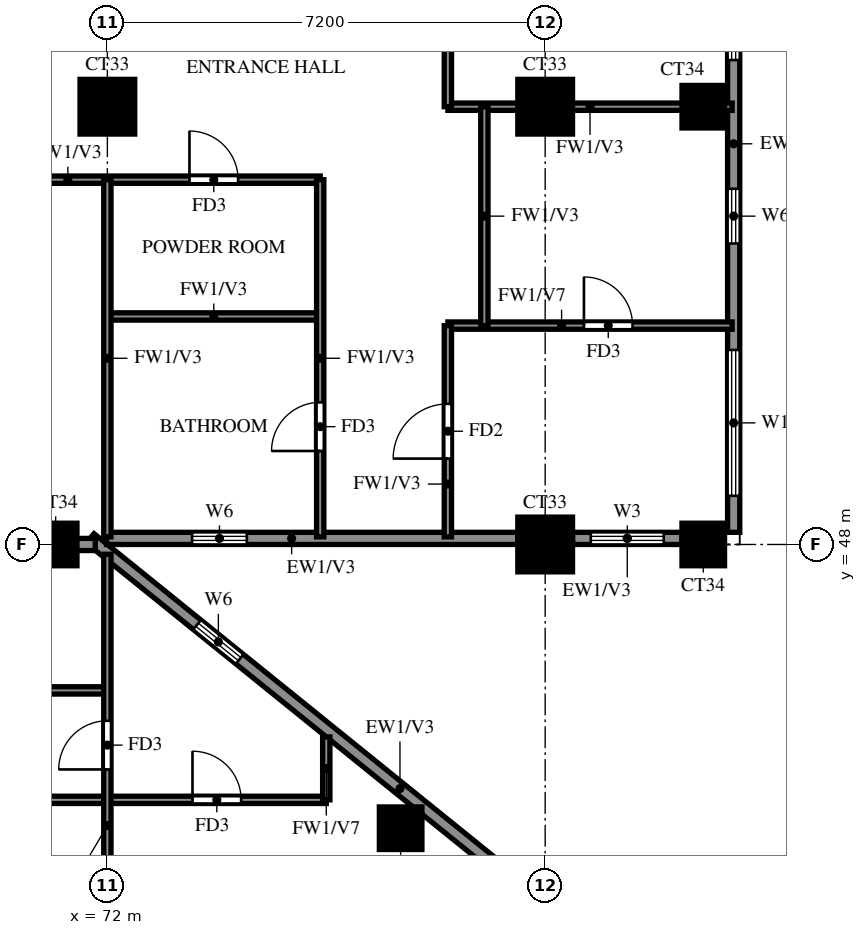
"""IFC4 building model, lengths in metres.
Left out: names, types, materials, properties, quantities, classifications, styles, units other than length and angle.
Written with IfcOpenShell. Run it as: python <this file> out.ifc"""

import sys

from ifc_helpers import new_model, si_unit, direction, frame, frame_2d, origin, origin_2d, place, context, subcontext, project, spatial, rectangle, extrude, source, transform, mapped, element, fill, save


model = new_model("IFC4")
c1 = context("Model", 3, precision=1e-05, world=origin(), true_north=direction((0.0, 1.0)))
c2 = subcontext(c1, "Body", "Model", "MODEL_VIEW")
j1 = project(units=[si_unit("LENGTHUNIT", "METRE"), si_unit("PLANEANGLEUNIT", "RADIAN")], contexts=[c1])
p1 = place(None, origin())
s1 = spatial("IfcSite", under=j1, at=p1, CompositionType="ELEMENT")
p2 = place(p1, origin())
s2 = spatial("IfcBuilding", under=s1, at=p2, CompositionType="ELEMENT")
p3 = place(p2, frame((0.0, 0.0, 229.0)))
s3 = spatial("IfcBuildingStorey", under=s2, at=p3, CompositionType="ELEMENT", Elevation=229.0)
m1 = source(origin(), c2, "Body", "SweptSolid", [
    extrude(rectangle(XDim=0.7, YDim=0.7, at=origin_2d()), origin(), (0.0, 0.0, 1.0), 3.22),
])
for number, where, z_axis, x_axis in (
    (1, (76.823, 43.333, 0.0), (0.0, 0.0, 1.0), (1.0, 0.0, 0.0)),
    (2, (71.15, 48.0, 0.0), (0.0, 0.0, 1.0), (1.0, 0.0, 0.0)),
):
    element("IfcColumn", number, at=place(p3, frame(where, z_axis=z_axis, x_axis=x_axis)), inside=s3, PredefinedType="COLUMN", context=c2, shape_type="MappedRepresentation", body=[
        mapped(m1, transform((0.0, 0.0, 0.0))),
    ])
m2 = source(origin(), c2, "Body", "SweptSolid", [
    extrude(rectangle(XDim=0.9, YDim=0.9, at=origin_2d()), origin(), (0.0, 0.0, 1.0), 3.22),
])
p4 = place(p3, frame((79.2, 48.0, 0.0), z_axis=(0.0, 0.0, 1.0), x_axis=(1.0, 0.0, 0.0)))
e3 = element("IfcColumn", 3, at=p4, inside=s3, PredefinedType="COLUMN", context=c2, shape_type="MappedRepresentation", body=[
    mapped(m2, transform((0.0, 0.0, 0.0))),
])
p5 = place(p3, frame((81.8, 48.0, 0.0), z_axis=(0.0, 0.0, 1.0), x_axis=(1.0, 0.0, 0.0)))
e4 = element("IfcColumn", 4, at=p5, inside=s3, PredefinedType="COLUMN", context=c2, shape_type="MappedRepresentation", body=[
    mapped(m1, transform((0.0, 0.0, 0.0))),
])
for number, where, z_axis, x_axis in (
    (5, (72.0, 55.2, 0.0), (0.0, 0.0, 1.0), (1.0, 0.0, 0.0)),
    (6, (79.2, 55.2, 0.0), (0.0, 0.0, 1.0), (1.0, 0.0, 0.0)),
):
    element("IfcColumn", number, at=place(p3, frame(where, z_axis=z_axis, x_axis=x_axis)), inside=s3, PredefinedType="COLUMN", context=c2, shape_type="MappedRepresentation", body=[
        mapped(m2, transform((0.0, 0.0, 0.0))),
    ])
p6 = place(p3, frame((81.8, 55.2, 0.0), z_axis=(0.0, 0.0, 1.0), x_axis=(1.0, 0.0, 0.0)))
e7 = element("IfcColumn", 7, at=p6, inside=s3, PredefinedType="COLUMN", context=c2, shape_type="MappedRepresentation", body=[
    mapped(m1, transform((0.0, 0.0, 0.0))),
])
p7 = place(p3, frame((81.907, 39.87, 0.0), z_axis=(0.0, 0.0, 1.0), x_axis=(-0.777936274417, 0.62834318087, 0.0)))
e8 = element("IfcWall", 8, at=p7, inside=s3, PredefinedType="SOLIDWALL", context=c2, shape_type="SweptSolid", body=[
    extrude(rectangle(XDim=13.099, YDim=0.2, at=frame_2d((6.549, 0.0))), origin(), (0.0, 0.0, 1.0), 3.22),
])
p8 = place(p7, frame((9.938, 0.0, 1.5)))
e9 = element("IfcOpeningElement", 9, at=p8, cuts=e8, PredefinedType="OPENING", context=c2, shape_type="SweptSolid", body=[
    extrude(rectangle(XDim=0.9, YDim=0.9, at=frame_2d((0.45, 0.45))), frame((0.0, 0.11, 0.0), z_axis=(0.0, -1.0, 0.0), x_axis=(1.0, 0.0, 0.0)), (0.0, 0.0, 1.0), 0.22),
])
p9 = place(p3, frame((71.987, 48.1, 0.0), z_axis=(0.0, 0.0, 1.0), x_axis=(1.0, 0.0, 0.0)))
e10 = element("IfcWall", 10, at=p9, inside=s3, PredefinedType="SOLIDWALL", context=c2, shape_type="SweptSolid", body=[
    extrude(rectangle(XDim=6.763, YDim=0.2, at=frame_2d((3.381, 0.0))), origin(), (0.0, 0.0, 1.0), 3.22),
])
p10 = place(p9, frame((1.406, 0.0, 1.5)))
e11 = element("IfcOpeningElement", 11, at=p10, cuts=e10, PredefinedType="OPENING", context=c2, shape_type="SweptSolid", body=[
    extrude(rectangle(XDim=0.9, YDim=0.9, at=frame_2d((0.45, 0.45))), frame((0.0, 0.11, 0.0), z_axis=(0.0, -1.0, 0.0), x_axis=(1.0, 0.0, 0.0)), (0.0, 0.0, 1.0), 0.22),
])
p11 = place(p3, frame((79.65, 48.1, 0.0), z_axis=(0.0, 0.0, 1.0), x_axis=(1.0, 0.0, 0.0)))
e12 = element("IfcWall", 12, at=p11, inside=s3, PredefinedType="SOLIDWALL", context=c2, shape_type="SweptSolid", body=[
    extrude(rectangle(XDim=1.8, YDim=0.2, at=frame_2d((0.9, 0.0))), origin(), (0.0, 0.0, 1.0), 3.22),
])
p12 = place(p11, frame((0.3, 0.0, 0.6)))
e13 = element("IfcOpeningElement", 13, at=p12, cuts=e12, PredefinedType="OPENING", context=c2, shape_type="SweptSolid", body=[
    extrude(rectangle(XDim=1.2, YDim=2.4, at=frame_2d((0.6, 1.2))), frame((0.0, 0.11, 0.0), z_axis=(0.0, -1.0, 0.0), x_axis=(1.0, 0.0, 0.0)), (0.0, 0.0, 1.0), 0.22),
])
p13 = place(p3, frame((82.3, 48.2, 0.0), z_axis=(0.0, 0.0, 1.0), x_axis=(0.0, 1.0, 0.0)))
e14 = element("IfcWall", 14, at=p13, inside=s3, PredefinedType="SOLIDWALL", context=c2, shape_type="SweptSolid", body=[
    extrude(rectangle(XDim=14.2, YDim=0.2, at=frame_2d((7.1, 0.0))), origin(), (0.0, 0.0, 1.0), 3.22),
])
p14 = place(p13, frame((0.6, 0.0, 0.6)))
e15 = element("IfcOpeningElement", 15, at=p14, cuts=e14, PredefinedType="OPENING", context=c2, shape_type="SweptSolid", body=[
    extrude(rectangle(XDim=2.4, YDim=2.4, at=frame_2d((1.2, 1.2))), frame((0.0, 0.11, 0.0), z_axis=(0.0, -1.0, 0.0), x_axis=(1.0, 0.0, 0.0)), (0.0, 0.0, 1.0), 0.22),
])
p15 = place(p13, frame((4.75, 0.0, 1.5)))
e16 = element("IfcOpeningElement", 16, at=p15, cuts=e14, PredefinedType="OPENING", context=c2, shape_type="SweptSolid", body=[
    extrude(rectangle(XDim=0.9, YDim=0.9, at=frame_2d((0.45, 0.45))), frame((0.0, 0.11, 0.0), z_axis=(0.0, -1.0, 0.0), x_axis=(1.0, 0.0, 0.0)), (0.0, 0.0, 1.0), 0.22),
])
p16 = place(p13, frame((7.767, 0.0, 0.6)))
e17 = element("IfcOpeningElement", 17, at=p16, cuts=e14, PredefinedType="OPENING", context=c2, shape_type="SweptSolid", body=[
    extrude(rectangle(XDim=2.4, YDim=2.4, at=frame_2d((1.2, 1.2))), frame((0.0, 0.11, 0.0), z_axis=(0.0, -1.0, 0.0), x_axis=(1.0, 0.0, 0.0)), (0.0, 0.0, 1.0), 0.22),
])
p17 = place(p13, frame((10.833, 0.0, 0.6)))
e18 = element("IfcOpeningElement", 18, at=p17, cuts=e14, PredefinedType="OPENING", context=c2, shape_type="SweptSolid", body=[
    extrude(rectangle(XDim=2.4, YDim=2.4, at=frame_2d((1.2, 1.2))), frame((0.0, 0.11, 0.0), z_axis=(0.0, -1.0, 0.0), x_axis=(1.0, 0.0, 0.0)), (0.0, 0.0, 1.0), 0.22),
])
p18 = place(p3, frame((67.2, 48.0, 0.0), z_axis=(0.0, 0.0, 1.0), x_axis=(1.0, 0.0, 0.0)))
e19 = element("IfcWall", 19, at=p18, inside=s3, PredefinedType="SOLIDWALL", context=c2, shape_type="SweptSolid", body=[
    extrude(rectangle(XDim=4.601, YDim=0.2, at=frame_2d((2.301, 0.0))), origin(), (0.0, 0.0, 1.0), 3.22),
])
p19 = place(p3, frame((60.0, 43.8, 0.0), z_axis=(0.0, 0.0, 1.0), x_axis=(1.0, 0.0, 0.0)))
e20 = element("IfcWall", 20, at=p19, inside=s3, PredefinedType="PARTITIONING", context=c2, shape_type="SweptSolid", body=[
    extrude(rectangle(XDim=15.6, YDim=0.12, at=frame_2d((7.8, 0.0))), origin(), (0.0, 0.0, 1.0), 3.22),
])
p20 = place(p19, frame((9.75, 0.0, 0.0)))
e21 = element("IfcOpeningElement", 21, at=p20, cuts=e20, PredefinedType="OPENING", context=c2, shape_type="SweptSolid", body=[
    extrude(rectangle(XDim=0.9, YDim=2.1, at=frame_2d((0.45, 1.05))), frame((0.0, 0.07, 0.0), z_axis=(0.0, -1.0, 0.0), x_axis=(1.0, 0.0, 0.0)), (0.0, 0.0, 1.0), 0.14),
])
p21 = place(p19, frame((3.45, 0.0, 0.0)))
e22 = element("IfcOpeningElement", 22, at=p21, cuts=e20, PredefinedType="OPENING", context=c2, shape_type="SweptSolid", body=[
    extrude(rectangle(XDim=1.5, YDim=2.1, at=frame_2d((0.75, 1.05))), frame((0.0, 0.07, 0.0), z_axis=(0.0, -1.0, 0.0), x_axis=(1.0, 0.0, 0.0)), (0.0, 0.0, 1.0), 0.14),
])
p22 = place(p19, frame((13.4, 0.0, 0.0)))
e23 = element("IfcOpeningElement", 23, at=p22, cuts=e20, PredefinedType="OPENING", context=c2, shape_type="SweptSolid", body=[
    extrude(rectangle(XDim=0.8, YDim=2.1, at=frame_2d((0.4, 1.05))), frame((0.0, 0.07, 0.0), z_axis=(0.0, -1.0, 0.0), x_axis=(1.0, 0.0, 0.0)), (0.0, 0.0, 1.0), 0.14),
])
p23 = place(p3, frame((67.2, 45.6, 0.0), z_axis=(0.0, 0.0, 1.0), x_axis=(1.0, 0.0, 0.0)))
e24 = element("IfcWall", 24, at=p23, inside=s3, PredefinedType="PARTITIONING", context=c2, shape_type="SweptSolid", body=[
    extrude(rectangle(XDim=4.8, YDim=0.12, at=frame_2d((2.4, 0.0))), origin(), (0.0, 0.0, 1.0), 3.22),
])
p24 = place(p23, frame((1.95, 0.0, 0.0)))
e25 = element("IfcOpeningElement", 25, at=p24, cuts=e24, PredefinedType="OPENING", context=c2, shape_type="SweptSolid", body=[
    extrude(rectangle(XDim=0.9, YDim=2.1, at=frame_2d((0.45, 1.05))), frame((0.0, 0.07, 0.0), z_axis=(0.0, -1.0, 0.0), x_axis=(1.0, 0.0, 0.0)), (0.0, 0.0, 1.0), 0.14),
])
p25 = place(p3, frame((77.6, 51.6, 0.0), z_axis=(0.0, 0.0, 1.0), x_axis=(1.0, 0.0, 0.0)))
e26 = element("IfcWall", 26, at=p25, inside=s3, PredefinedType="PARTITIONING", context=c2, shape_type="SweptSolid", body=[
    extrude(rectangle(XDim=4.675, YDim=0.12, at=frame_2d((2.337, 0.0))), origin(), (0.0, 0.0, 1.0), 2.32),
])
p26 = place(p25, frame((2.238, 0.0, 0.0)))
e27 = element("IfcOpeningElement", 27, at=p26, cuts=e26, PredefinedType="OPENING", context=c2, shape_type="SweptSolid", body=[
    extrude(rectangle(XDim=0.8, YDim=2.1, at=frame_2d((0.4, 1.05))), frame((0.0, 0.07, 0.0), z_axis=(0.0, -1.0, 0.0), x_axis=(1.0, 0.0, 0.0)), (0.0, 0.0, 1.0), 0.14),
])
p27 = place(p3, frame((72.0, 51.75, 0.0), z_axis=(0.0, 0.0, 1.0), x_axis=(1.0, 0.0, 0.0)))
e28 = element("IfcWall", 28, at=p27, inside=s3, PredefinedType="PARTITIONING", context=c2, shape_type="SweptSolid", body=[
    extrude(rectangle(XDim=3.5, YDim=0.12, at=frame_2d((1.75, 0.0))), origin(), (0.0, 0.0, 1.0), 3.22),
])
p28 = place(p3, frame((67.2, 54.0, 0.0), z_axis=(0.0, 0.0, 1.0), x_axis=(1.0, 0.0, 0.0)))
e29 = element("IfcWall", 29, at=p28, inside=s3, PredefinedType="PARTITIONING", context=c2, shape_type="SweptSolid", body=[
    extrude(rectangle(XDim=8.3, YDim=0.12, at=frame_2d((4.15, 0.0))), origin(), (0.0, 0.0, 1.0), 3.22),
])
p29 = place(p28, frame((6.15, 0.0, 0.0)))
e30 = element("IfcOpeningElement", 30, at=p29, cuts=e29, PredefinedType="OPENING", context=c2, shape_type="SweptSolid", body=[
    extrude(rectangle(XDim=0.8, YDim=2.1, at=frame_2d((0.4, 1.05))), frame((0.0, 0.07, 0.0), z_axis=(0.0, -1.0, 0.0), x_axis=(1.0, 0.0, 0.0)), (0.0, 0.0, 1.0), 0.14),
])
p30 = place(p28, frame((1.95, 0.0, 0.0)))
e31 = element("IfcOpeningElement", 31, at=p30, cuts=e29, PredefinedType="OPENING", context=c2, shape_type="SweptSolid", body=[
    extrude(rectangle(XDim=0.9, YDim=2.1, at=frame_2d((0.45, 1.05))), frame((0.0, 0.07, 0.0), z_axis=(0.0, -1.0, 0.0), x_axis=(1.0, 0.0, 0.0)), (0.0, 0.0, 1.0), 0.14),
])
p31 = place(p3, frame((77.6, 55.2, 0.0), z_axis=(0.0, 0.0, 1.0), x_axis=(1.0, 0.0, 0.0)))
e32 = element("IfcWall", 32, at=p31, inside=s3, PredefinedType="PARTITIONING", context=c2, shape_type="SweptSolid", body=[
    extrude(rectangle(XDim=4.675, YDim=0.12, at=frame_2d((2.337, 0.0))), origin(), (0.0, 0.0, 1.0), 3.22),
])
p32 = place(p3, frame((72.0, 39.725, 0.0), z_axis=(0.0, 0.0, 1.0), x_axis=(0.0, 1.0, 0.0)))
e33 = element("IfcWall", 33, at=p32, inside=s3, PredefinedType="PARTITIONING", context=c2, shape_type="SweptSolid", body=[
    extrude(rectangle(XDim=8.114, YDim=0.12, at=frame_2d((4.057, 0.0))), origin(), (0.0, 0.0, 1.0), 2.32),
])
p33 = place(p32, frame((1.788, 0.0, 0.0)))
e34 = element("IfcOpeningElement", 34, at=p33, cuts=e33, PredefinedType="OPENING", context=c2, shape_type="SweptSolid", body=[
    extrude(rectangle(XDim=0.9, YDim=2.1, at=frame_2d((0.45, 1.05))), frame((0.0, 0.07, 0.0), z_axis=(0.0, -1.0, 0.0), x_axis=(1.0, 0.0, 0.0)), (0.0, 0.0, 1.0), 0.14),
])
p34 = place(p32, frame((4.575, 0.0, 0.0)))
e35 = element("IfcOpeningElement", 35, at=p34, cuts=e33, PredefinedType="OPENING", context=c2, shape_type="SweptSolid", body=[
    extrude(rectangle(XDim=0.8, YDim=2.1, at=frame_2d((0.4, 1.05))), frame((0.0, 0.07, 0.0), z_axis=(0.0, -1.0, 0.0), x_axis=(1.0, 0.0, 0.0)), (0.0, 0.0, 1.0), 0.14),
])
p35 = place(p3, frame((72.0, 48.125, 0.0), z_axis=(0.0, 0.0, 1.0), x_axis=(0.0, 1.0, 0.0)))
e36 = element("IfcWall", 36, at=p35, inside=s3, PredefinedType="PARTITIONING", context=c2, shape_type="SweptSolid", body=[
    extrude(rectangle(XDim=5.875, YDim=0.12, at=frame_2d((2.938, 0.0))), origin(), (0.0, 0.0, 1.0), 3.22),
])
p36 = place(p3, frame((75.5, 48.125, 0.0), z_axis=(0.0, 0.0, 1.0), x_axis=(0.0, 1.0, 0.0)))
e37 = element("IfcWall", 37, at=p36, inside=s3, PredefinedType="PARTITIONING", context=c2, shape_type="SweptSolid", body=[
    extrude(rectangle(XDim=5.875, YDim=0.12, at=frame_2d((2.938, 0.0))), origin(), (0.0, 0.0, 1.0), 3.22),
])
p37 = place(p36, frame((1.413, 0.0, 0.0)))
e38 = element("IfcOpeningElement", 38, at=p37, cuts=e37, PredefinedType="OPENING", context=c2, shape_type="SweptSolid", body=[
    extrude(rectangle(XDim=0.8, YDim=2.1, at=frame_2d((0.4, 1.05))), frame((0.0, 0.07, 0.0), z_axis=(0.0, -1.0, 0.0), x_axis=(1.0, 0.0, 0.0)), (0.0, 0.0, 1.0), 0.14),
])
p38 = place(p3, frame((75.6, 43.8, 0.0), z_axis=(0.0, 0.0, 1.0), x_axis=(0.0, 1.0, 0.0)))
e39 = element("IfcWall", 39, at=p38, inside=s3, PredefinedType="PARTITIONING", context=c2, shape_type="SweptSolid", body=[
    extrude(rectangle(XDim=1.035, YDim=0.12, at=frame_2d((0.518, 0.0))), origin(), (0.0, 0.0, 1.0), 2.32),
])
p39 = place(p3, frame((77.6, 48.125, 0.0), z_axis=(0.0, 0.0, 1.0), x_axis=(0.0, 1.0, 0.0)))
e40 = element("IfcWall", 40, at=p39, inside=s3, PredefinedType="PARTITIONING", context=c2, shape_type="SweptSolid", body=[
    extrude(rectangle(XDim=3.475, YDim=0.12, at=frame_2d((1.738, 0.0))), origin(), (0.0, 0.0, 1.0), 3.22),
])
p40 = place(p39, frame((1.288, 0.0, 0.0)))
e41 = element("IfcOpeningElement", 41, at=p40, cuts=e40, PredefinedType="OPENING", context=c2, shape_type="SweptSolid", body=[
    extrude(rectangle(XDim=0.9, YDim=2.1, at=frame_2d((0.45, 1.05))), frame((0.0, 0.07, 0.0), z_axis=(0.0, -1.0, 0.0), x_axis=(1.0, 0.0, 0.0)), (0.0, 0.0, 1.0), 0.14),
])
p41 = place(p3, frame((77.6, 55.2, 0.0), z_axis=(0.0, 0.0, 1.0), x_axis=(0.0, 1.0, 0.0)))
e42 = element("IfcWall", 42, at=p41, inside=s3, PredefinedType="PARTITIONING", context=c2, shape_type="SweptSolid", body=[
    extrude(rectangle(XDim=18.0, YDim=0.12, at=frame_2d((9.0, 0.0))), origin(), (0.0, 0.0, 1.0), 3.22),
])
p42 = place(p41, frame((2.85, 0.0, 0.0)))
e43 = element("IfcOpeningElement", 43, at=p42, cuts=e42, PredefinedType="OPENING", context=c2, shape_type="SweptSolid", body=[
    extrude(rectangle(XDim=1.5, YDim=2.1, at=frame_2d((0.75, 1.05))), frame((0.0, 0.07, 0.0), z_axis=(0.0, -1.0, 0.0), x_axis=(1.0, 0.0, 0.0)), (0.0, 0.0, 1.0), 0.14),
])
p43 = place(p41, frame((8.55, 0.0, 0.0)))
e44 = element("IfcOpeningElement", 44, at=p43, cuts=e42, PredefinedType="OPENING", context=c2, shape_type="SweptSolid", body=[
    extrude(rectangle(XDim=0.9, YDim=2.1, at=frame_2d((0.45, 1.05))), frame((0.0, 0.07, 0.0), z_axis=(0.0, -1.0, 0.0), x_axis=(1.0, 0.0, 0.0)), (0.0, 0.0, 1.0), 0.14),
])
p44 = place(p41, frame((12.15, 0.0, 0.0)))
e45 = element("IfcOpeningElement", 45, at=p44, cuts=e42, PredefinedType="OPENING", context=c2, shape_type="SweptSolid", body=[
    extrude(rectangle(XDim=0.9, YDim=2.1, at=frame_2d((0.45, 1.05))), frame((0.0, 0.07, 0.0), z_axis=(0.0, -1.0, 0.0), x_axis=(1.0, 0.0, 0.0)), (0.0, 0.0, 1.0), 0.14),
])
p45 = place(p41, frame((15.75, 0.0, 0.0)))
e46 = element("IfcOpeningElement", 46, at=p45, cuts=e42, PredefinedType="OPENING", context=c2, shape_type="SweptSolid", body=[
    extrude(rectangle(XDim=0.9, YDim=2.1, at=frame_2d((0.45, 1.05))), frame((0.0, 0.07, 0.0), z_axis=(0.0, -1.0, 0.0), x_axis=(1.0, 0.0, 0.0)), (0.0, 0.0, 1.0), 0.14),
])
p46 = place(p3, frame((78.2, 51.6, 0.0), z_axis=(0.0, 0.0, 1.0), x_axis=(0.0, 1.0, 0.0)))
e47 = element("IfcWall", 47, at=p46, inside=s3, PredefinedType="PARTITIONING", context=c2, shape_type="SweptSolid", body=[
    extrude(rectangle(XDim=3.6, YDim=0.12, at=frame_2d((1.8, 0.0))), origin(), (0.0, 0.0, 1.0), 3.22),
])
p47 = place(p8, origin())
e48 = element("IfcWindow", 48, at=p47, inside=s3, PartitioningType="SINGLE_PANEL", PredefinedType="WINDOW", context=c2, shape_type="SweptSolid", body=[
    extrude(rectangle(XDim=0.9, YDim=0.9, at=frame_2d((0.45, 0.45))), frame((0.0, 0.03, 0.0), z_axis=(0.0, -1.0, 0.0), x_axis=(1.0, 0.0, 0.0)), (0.0, 0.0, 1.0), 0.06),
])
fill(e9, e48)
p48 = place(p10, origin())
e49 = element("IfcWindow", 49, at=p48, inside=s3, PartitioningType="SINGLE_PANEL", PredefinedType="WINDOW", context=c2, shape_type="SweptSolid", body=[
    extrude(rectangle(XDim=0.9, YDim=0.9, at=frame_2d((0.45, 0.45))), frame((0.0, 0.03, 0.0), z_axis=(0.0, -1.0, 0.0), x_axis=(1.0, 0.0, 0.0)), (0.0, 0.0, 1.0), 0.06),
])
fill(e11, e49)
p49 = place(p12, origin())
e50 = element("IfcWindow", 50, at=p49, inside=s3, PartitioningType="SINGLE_PANEL", PredefinedType="WINDOW", context=c2, shape_type="SweptSolid", body=[
    extrude(rectangle(XDim=1.2, YDim=2.4, at=frame_2d((0.6, 1.2))), frame((0.0, 0.03, 0.0), z_axis=(0.0, -1.0, 0.0), x_axis=(1.0, 0.0, 0.0)), (0.0, 0.0, 1.0), 0.06),
])
fill(e13, e50)
p50 = place(p14, origin())
e51 = element("IfcWindow", 51, at=p50, inside=s3, PartitioningType="DOUBLE_PANEL_VERTICAL", PredefinedType="WINDOW", context=c2, shape_type="SweptSolid", body=[
    extrude(rectangle(XDim=2.4, YDim=2.4, at=frame_2d((1.2, 1.2))), frame((0.0, 0.03, 0.0), z_axis=(0.0, -1.0, 0.0), x_axis=(1.0, 0.0, 0.0)), (0.0, 0.0, 1.0), 0.06),
])
fill(e15, e51)
p51 = place(p15, origin())
e52 = element("IfcWindow", 52, at=p51, inside=s3, PartitioningType="SINGLE_PANEL", PredefinedType="WINDOW", context=c2, shape_type="SweptSolid", body=[
    extrude(rectangle(XDim=0.9, YDim=0.9, at=frame_2d((0.45, 0.45))), frame((0.0, 0.03, 0.0), z_axis=(0.0, -1.0, 0.0), x_axis=(1.0, 0.0, 0.0)), (0.0, 0.0, 1.0), 0.06),
])
fill(e16, e52)
p52 = place(p16, origin())
e53 = element("IfcWindow", 53, at=p52, inside=s3, PartitioningType="DOUBLE_PANEL_VERTICAL", PredefinedType="WINDOW", context=c2, shape_type="SweptSolid", body=[
    extrude(rectangle(XDim=2.4, YDim=2.4, at=frame_2d((1.2, 1.2))), frame((0.0, 0.03, 0.0), z_axis=(0.0, -1.0, 0.0), x_axis=(1.0, 0.0, 0.0)), (0.0, 0.0, 1.0), 0.06),
])
fill(e17, e53)
p53 = place(p40, origin())
e54 = element("IfcDoor", 54, at=p53, inside=s3, OperationType="SINGLE_SWING_LEFT", PredefinedType="DOOR", context=c2, shape_type="SweptSolid", body=[
    extrude(rectangle(XDim=0.9, YDim=2.1, at=frame_2d((0.45, 1.05))), frame((0.0, 0.025, 0.0), z_axis=(0.0, -1.0, 0.0), x_axis=(1.0, 0.0, 0.0)), (0.0, 0.0, 1.0), 0.05),
])
fill(e41, e54)
p54 = place(p26, origin())
e55 = element("IfcDoor", 55, at=p54, inside=s3, OperationType="SINGLE_SWING_RIGHT", PredefinedType="DOOR", context=c2, shape_type="SweptSolid", body=[
    extrude(rectangle(XDim=0.8, YDim=2.1, at=frame_2d((0.4, 1.05))), frame((0.0, 0.025, 0.0), z_axis=(0.0, -1.0, 0.0), x_axis=(1.0, 0.0, 0.0)), (0.0, 0.0, 1.0), 0.05),
])
fill(e27, e55)
p55 = place(p37, origin())
e56 = element("IfcDoor", 56, at=p55, inside=s3, OperationType="SINGLE_SWING_LEFT", PredefinedType="DOOR", context=c2, shape_type="SweptSolid", body=[
    extrude(rectangle(XDim=0.8, YDim=2.1, at=frame_2d((0.4, 1.05))), frame((0.0, 0.025, 0.0), z_axis=(0.0, -1.0, 0.0), x_axis=(1.0, 0.0, 0.0)), (0.0, 0.0, 1.0), 0.05),
])
fill(e38, e56)
p56 = place(p29, origin())
e57 = element("IfcDoor", 57, at=p56, inside=s3, OperationType="SINGLE_SWING_RIGHT", PredefinedType="DOOR", context=c2, shape_type="SweptSolid", body=[
    extrude(rectangle(XDim=0.8, YDim=2.1, at=frame_2d((0.4, 1.05))), frame((0.0, 0.025, 0.0), z_axis=(0.0, -1.0, 0.0), x_axis=(1.0, 0.0, 0.0)), (0.0, 0.0, 1.0), 0.05),
])
fill(e30, e57)
p57 = place(p34, origin())
e58 = element("IfcDoor", 58, at=p57, inside=s3, OperationType="SINGLE_SWING_LEFT", PredefinedType="DOOR", context=c2, shape_type="SweptSolid", body=[
    extrude(rectangle(XDim=0.8, YDim=2.1, at=frame_2d((0.4, 1.05))), frame((0.0, 0.025, 0.0), z_axis=(0.0, -1.0, 0.0), x_axis=(1.0, 0.0, 0.0)), (0.0, 0.0, 1.0), 0.05),
])
fill(e35, e58)
p58 = place(p22, origin())
e59 = element("IfcDoor", 59, at=p58, inside=s3, OperationType="SINGLE_SWING_LEFT", PredefinedType="DOOR", context=c2, shape_type="SweptSolid", body=[
    extrude(rectangle(XDim=0.8, YDim=2.1, at=frame_2d((0.4, 1.05))), frame((0.0, 0.025, 0.0), z_axis=(0.0, -1.0, 0.0), x_axis=(1.0, 0.0, 0.0)), (0.0, 0.0, 1.0), 0.05),
])
fill(e23, e59)
save(model, sys.argv[1])
